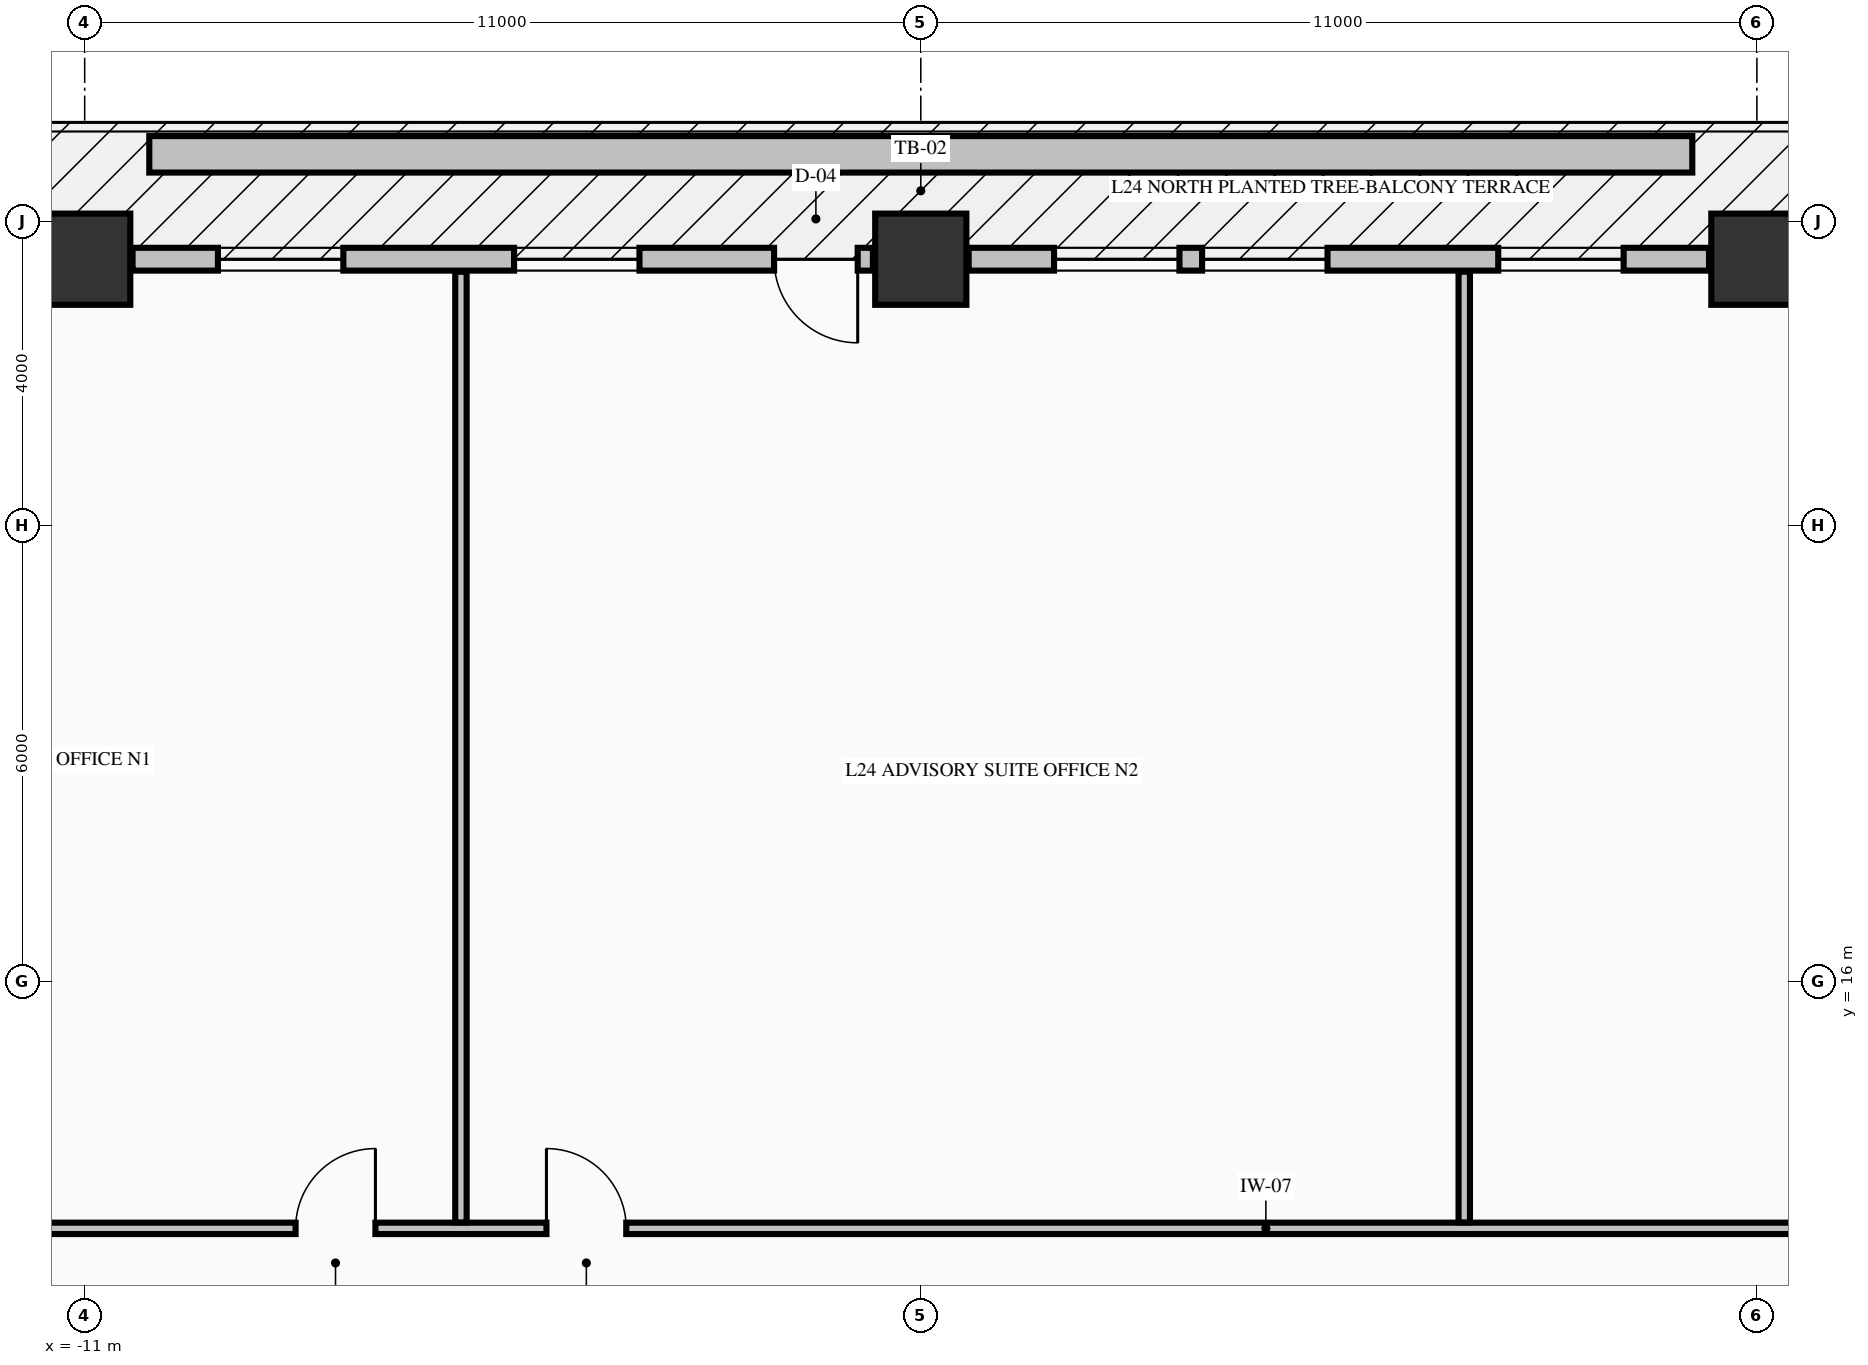
"""IFC4 building model, lengths in metres.
Left out: names, types, materials, properties, quantities, classifications, styles, units other than length and angle.
Written with IfcOpenShell. Run it as: python <this file> out.ifc"""

import sys

from ifc_helpers import new_model, si_unit, direction, frame, frame_2d, origin, origin_2d, place, context, subcontext, project, spatial, rectangle, extrude, element, fill, save


model = new_model("IFC4")
c1 = context("Model", 3, precision=1e-05, world=origin(), true_north=direction((0.0, 1.0)))
c2 = subcontext(c1, "Body", "Model", "MODEL_VIEW")
j1 = project(units=[si_unit("LENGTHUNIT", "METRE"), si_unit("PLANEANGLEUNIT", "RADIAN")], contexts=[c1])
p1 = place(None, origin())
s1 = spatial("IfcSite", under=j1, at=p1, CompositionType="ELEMENT")
p2 = place(p1, origin())
s2 = spatial("IfcBuilding", under=s1, at=p2, CompositionType="ELEMENT")
p3 = place(p2, frame((0.0, 0.0, 98.5)))
s3 = spatial("IfcBuildingStorey", under=s2, at=p3, CompositionType="ELEMENT", Elevation=98.5)
for number, where, z_axis, x_axis in (
    (1, (-11.0, 25.5, -0.275), (0.0, 0.0, 1.0), (1.0, 0.0, 0.0)),
    (2, (0.0, 25.5, -0.275), (0.0, 0.0, 1.0), (1.0, 0.0, 0.0)),
    (3, (11.0, 25.5, -0.275), (0.0, 0.0, 1.0), (1.0, 0.0, 0.0)),
):
    element("IfcColumn", number, at=place(p3, frame(where, z_axis=z_axis, x_axis=x_axis)), inside=s3, PredefinedType="COLUMN", context=c2, shape_type="SweptSolid", body=[
        extrude(rectangle(XDim=1.2, YDim=1.2, at=origin_2d()), origin(), (0.0, 0.0, 1.0), 3.595),
    ])
p4 = place(p3, frame((-0.63, 25.5, 0.0), z_axis=(0.0, 0.0, 1.0), x_axis=(-1.0, 0.0, 0.0)))
e4 = element("IfcWall", 4, at=p4, inside=s3, PredefinedType="STANDARD", context=c2, shape_type="SweptSolid", body=[
    extrude(rectangle(XDim=9.74, YDim=0.3, at=frame_2d((4.87, 0.0))), origin(), (0.0, 0.0, 1.0), 2.712),
])
p5 = place(p4, frame((0.2, 0.0, 0.0)))
e5 = element("IfcOpeningElement", 5, at=p5, cuts=e4, PredefinedType="OPENING", context=c2, shape_type="SweptSolid", body=[
    extrude(rectangle(XDim=1.1, YDim=2.15, at=frame_2d((0.55, 1.075))), frame((0.0, 0.16, 0.0), z_axis=(0.0, -1.0, 0.0), x_axis=(1.0, 0.0, 0.0)), (0.0, 0.0, 1.0), 0.32),
])
p6 = place(p4, frame((3.071, 0.0, 0.8)))
e6 = element("IfcOpeningElement", 6, at=p6, cuts=e4, PredefinedType="OPENING", context=c2, shape_type="SweptSolid", body=[
    extrude(rectangle(XDim=1.65, YDim=1.7, at=frame_2d((0.825, 0.85))), frame((0.0, 0.16, 0.0), z_axis=(0.0, -1.0, 0.0), x_axis=(1.0, 0.0, 0.0)), (0.0, 0.0, 1.0), 0.32),
])
p7 = place(p4, frame((6.967, 0.0, 0.8)))
e7 = element("IfcOpeningElement", 7, at=p7, cuts=e4, PredefinedType="OPENING", context=c2, shape_type="SweptSolid", body=[
    extrude(rectangle(XDim=1.65, YDim=1.7, at=frame_2d((0.825, 0.85))), frame((0.0, 0.16, 0.0), z_axis=(0.0, -1.0, 0.0), x_axis=(1.0, 0.0, 0.0)), (0.0, 0.0, 1.0), 0.32),
])
p8 = place(p3, frame((10.37, 25.5, 0.0), z_axis=(0.0, 0.0, 1.0), x_axis=(-1.0, 0.0, 0.0)))
e8 = element("IfcWall", 8, at=p8, inside=s3, PredefinedType="STANDARD", context=c2, shape_type="SweptSolid", body=[
    extrude(rectangle(XDim=9.74, YDim=0.3, at=frame_2d((4.87, 0.0))), origin(), (0.0, 0.0, 1.0), 2.712),
])
p9 = place(p8, frame((1.123, 0.0, 0.8)))
e9 = element("IfcOpeningElement", 9, at=p9, cuts=e8, PredefinedType="OPENING", context=c2, shape_type="SweptSolid", body=[
    extrude(rectangle(XDim=1.65, YDim=1.7, at=frame_2d((0.825, 0.85))), frame((0.0, 0.16, 0.0), z_axis=(0.0, -1.0, 0.0), x_axis=(1.0, 0.0, 0.0)), (0.0, 0.0, 1.0), 0.32),
])
p10 = place(p8, frame((5.019, 0.0, 0.8)))
e10 = element("IfcOpeningElement", 10, at=p10, cuts=e8, PredefinedType="OPENING", context=c2, shape_type="SweptSolid", body=[
    extrude(rectangle(XDim=1.65, YDim=1.7, at=frame_2d((0.825, 0.85))), frame((0.0, 0.16, 0.0), z_axis=(0.0, -1.0, 0.0), x_axis=(1.0, 0.0, 0.0)), (0.0, 0.0, 1.0), 0.32),
])
p11 = place(p8, frame((6.967, 0.0, 0.8)))
e11 = element("IfcOpeningElement", 11, at=p11, cuts=e8, PredefinedType="OPENING", context=c2, shape_type="SweptSolid", body=[
    extrude(rectangle(XDim=1.65, YDim=1.7, at=frame_2d((0.825, 0.85))), frame((0.0, 0.16, 0.0), z_axis=(0.0, -1.0, 0.0), x_axis=(1.0, 0.0, 0.0)), (0.0, 0.0, 1.0), 0.32),
])
p12 = place(p3, frame((-22.835, 12.75, 0.0), z_axis=(0.0, 0.0, 1.0), x_axis=(1.0, 0.0, 0.0)))
e12 = element("IfcWall", 12, at=p12, inside=s3, PredefinedType="PARTITIONING", context=c2, shape_type="SweptSolid", body=[
    extrude(rectangle(XDim=50.67, YDim=0.15, at=frame_2d((25.335, 0.0))), origin(), (0.0, 0.0, 1.0), 3.32),
])
p13 = place(p12, frame((14.61, 0.0, 0.0)))
e13 = element("IfcOpeningElement", 13, at=p13, cuts=e12, PredefinedType="OPENING", context=c2, shape_type="SweptSolid", body=[
    extrude(rectangle(XDim=1.05, YDim=2.15, at=frame_2d((0.525, 1.075))), frame((0.0, 0.085, 0.0), z_axis=(0.0, -1.0, 0.0), x_axis=(1.0, 0.0, 0.0)), (0.0, 0.0, 1.0), 0.17),
])
p14 = place(p12, frame((17.91, 0.0, 0.0)))
e14 = element("IfcOpeningElement", 14, at=p14, cuts=e12, PredefinedType="OPENING", context=c2, shape_type="SweptSolid", body=[
    extrude(rectangle(XDim=1.05, YDim=2.15, at=frame_2d((0.525, 1.075))), frame((0.0, 0.085, 0.0), z_axis=(0.0, -1.0, 0.0), x_axis=(1.0, 0.0, 0.0)), (0.0, 0.0, 1.0), 0.17),
])
p15 = place(p12, frame((35.79, 0.0, 0.0)))
e15 = element("IfcOpeningElement", 15, at=p15, cuts=e12, PredefinedType="OPENING", context=c2, shape_type="SweptSolid", body=[
    extrude(rectangle(XDim=1.05, YDim=2.15, at=frame_2d((0.525, 1.075))), frame((0.0, 0.085, 0.0), z_axis=(0.0, -1.0, 0.0), x_axis=(1.0, 0.0, 0.0)), (0.0, 0.0, 1.0), 0.17),
])
for number, where, z_axis, x_axis in (
    (16, (-6.05, 12.828, 0.0), (0.0, 0.0, 1.0), (0.0, 1.0, 0.0)),
    (17, (7.15, 12.828, 0.0), (0.0, 0.0, 1.0), (0.0, 1.0, 0.0)),
):
    element("IfcWall", number, at=place(p3, frame(where, z_axis=z_axis, x_axis=x_axis)), inside=s3, PredefinedType="PARTITIONING", context=c2, shape_type="SweptSolid", body=[
        extrude(rectangle(XDim=12.507, YDim=0.15, at=frame_2d((6.253, 0.0))), origin(), (0.0, 0.0, 1.0), 3.32),
    ])
p16 = place(p3, frame((-10.15, 26.88, -0.04), z_axis=(0.0, 0.0, 1.0), x_axis=(1.0, 0.0, 0.0)))
e18 = element("IfcWall", 18, at=p16, inside=s3, PredefinedType="PARAPET", context=c2, shape_type="SweptSolid", body=[
    extrude(rectangle(XDim=20.3, YDim=0.48, at=frame_2d((10.15, 0.0))), origin(), (0.0, 0.0, 1.0), 0.52),
])
p17 = place(p5, origin())
e19 = element("IfcDoor", 19, at=p17, inside=s3, OperationType="SINGLE_SWING_LEFT", PredefinedType="DOOR", context=c2, shape_type="SweptSolid", body=[
    extrude(rectangle(XDim=1.1, YDim=2.15, at=frame_2d((0.55, 1.075))), frame((0.0, 0.025, 0.0), z_axis=(0.0, -1.0, 0.0), x_axis=(1.0, 0.0, 0.0)), (0.0, 0.0, 1.0), 0.05),
])
fill(e5, e19)
p18 = place(p6, origin())
e20 = element("IfcWindow", 20, at=p18, inside=s3, PartitioningType="SINGLE_PANEL", PredefinedType="WINDOW", context=c2, shape_type="SweptSolid", body=[
    extrude(rectangle(XDim=1.65, YDim=1.7, at=frame_2d((0.825, 0.85))), frame((0.0, 0.03, 0.0), z_axis=(0.0, -1.0, 0.0), x_axis=(1.0, 0.0, 0.0)), (0.0, 0.0, 1.0), 0.06),
])
fill(e6, e20)
p19 = place(p7, origin())
e21 = element("IfcWindow", 21, at=p19, inside=s3, PartitioningType="SINGLE_PANEL", PredefinedType="WINDOW", context=c2, shape_type="SweptSolid", body=[
    extrude(rectangle(XDim=1.65, YDim=1.7, at=frame_2d((0.825, 0.85))), frame((0.0, 0.03, 0.0), z_axis=(0.0, -1.0, 0.0), x_axis=(1.0, 0.0, 0.0)), (0.0, 0.0, 1.0), 0.06),
])
fill(e7, e21)
p20 = place(p9, origin())
e22 = element("IfcWindow", 22, at=p20, inside=s3, PartitioningType="SINGLE_PANEL", PredefinedType="WINDOW", context=c2, shape_type="SweptSolid", body=[
    extrude(rectangle(XDim=1.65, YDim=1.7, at=frame_2d((0.825, 0.85))), frame((0.0, 0.03, 0.0), z_axis=(0.0, -1.0, 0.0), x_axis=(1.0, 0.0, 0.0)), (0.0, 0.0, 1.0), 0.06),
])
fill(e9, e22)
p21 = place(p10, origin())
e23 = element("IfcWindow", 23, at=p21, inside=s3, PartitioningType="SINGLE_PANEL", PredefinedType="WINDOW", context=c2, shape_type="SweptSolid", body=[
    extrude(rectangle(XDim=1.65, YDim=1.7, at=frame_2d((0.825, 0.85))), frame((0.0, 0.03, 0.0), z_axis=(0.0, -1.0, 0.0), x_axis=(1.0, 0.0, 0.0)), (0.0, 0.0, 1.0), 0.06),
])
fill(e10, e23)
p22 = place(p11, origin())
e24 = element("IfcWindow", 24, at=p22, inside=s3, PartitioningType="SINGLE_PANEL", PredefinedType="WINDOW", context=c2, shape_type="SweptSolid", body=[
    extrude(rectangle(XDim=1.65, YDim=1.7, at=frame_2d((0.825, 0.85))), frame((0.0, 0.03, 0.0), z_axis=(0.0, -1.0, 0.0), x_axis=(1.0, 0.0, 0.0)), (0.0, 0.0, 1.0), 0.06),
])
fill(e11, e24)
p23 = place(p13, origin())
e25 = element("IfcDoor", 25, at=p23, inside=s3, OperationType="SINGLE_SWING_RIGHT", PredefinedType="DOOR", context=c2, shape_type="SweptSolid", body=[
    extrude(rectangle(XDim=1.05, YDim=2.15, at=frame_2d((0.525, 1.075))), frame((0.0, 0.025, 0.0), z_axis=(0.0, -1.0, 0.0), x_axis=(1.0, 0.0, 0.0)), (0.0, 0.0, 1.0), 0.05),
])
fill(e13, e25)
p24 = place(p14, origin())
e26 = element("IfcDoor", 26, at=p24, inside=s3, OperationType="SINGLE_SWING_LEFT", PredefinedType="DOOR", context=c2, shape_type="SweptSolid", body=[
    extrude(rectangle(XDim=1.05, YDim=2.15, at=frame_2d((0.525, 1.075))), frame((0.0, 0.025, 0.0), z_axis=(0.0, -1.0, 0.0), x_axis=(1.0, 0.0, 0.0)), (0.0, 0.0, 1.0), 0.05),
])
fill(e14, e26)
save(model, sys.argv[1])
